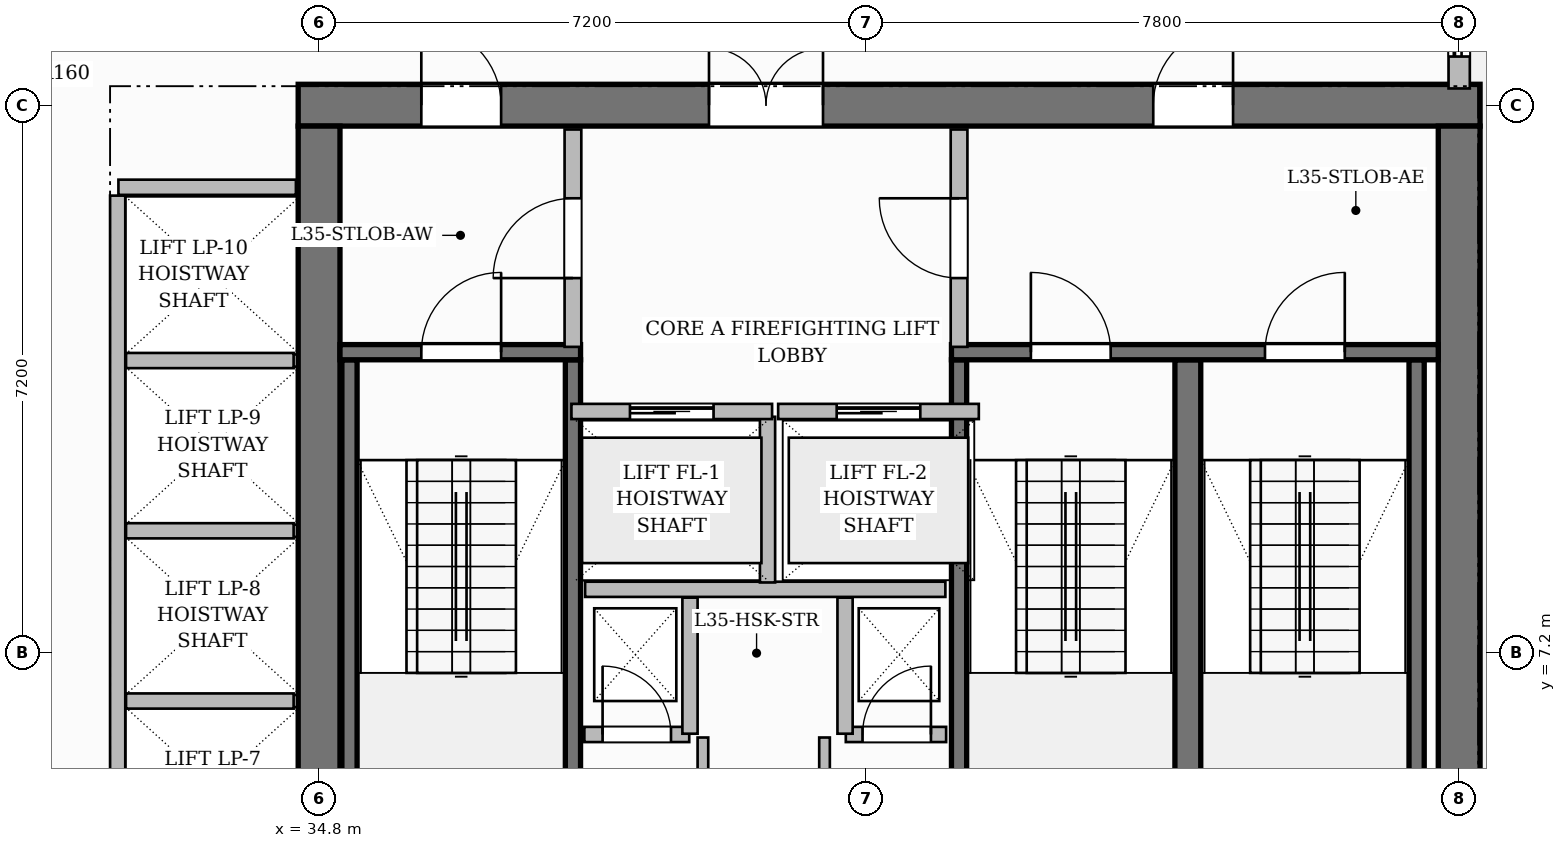
"""IFC4 building model, lengths in metres.
Left out: names, types, materials, properties, quantities, classifications, styles, units other than length and angle.
Written with IfcOpenShell. Run it as: python <this file> out.ifc"""

import sys

from ifc_helpers import new_model, si_unit, direction, frame, frame_2d, origin, place, context, subcontext, project, spatial, rectangle, extrude, source, transform, mapped, element, fill, save


model = new_model("IFC4")
c1 = context("Model", 3, precision=1e-05, world=origin(), true_north=direction((0.0, 1.0)))
c2 = subcontext(c1, "Body", "Model", "MODEL_VIEW")
j1 = project(units=[si_unit("LENGTHUNIT", "METRE"), si_unit("PLANEANGLEUNIT", "RADIAN")], contexts=[c1])
p1 = place(None, origin())
s1 = spatial("IfcSite", under=j1, at=p1, CompositionType="ELEMENT")
p2 = place(p1, origin())
s2 = spatial("IfcBuilding", under=s1, at=p2, CompositionType="ELEMENT")
p3 = place(p2, frame((0.0, 0.0, 141.4)))
s3 = spatial("IfcBuildingStorey", under=s2, at=p3, CompositionType="ELEMENT", Elevation=141.4)
p4 = place(p3, frame((34.525, 14.4, 0.0), z_axis=(0.0, 0.0, 1.0), x_axis=(1.0, 0.0, 0.0)))
e1 = element("IfcWall", 1, at=p4, inside=s3, PredefinedType="SHEAR", context=c2, shape_type="SweptSolid", body=[
    extrude(rectangle(XDim=15.55, YDim=0.55, at=frame_2d((7.775, 0.0))), origin(), (0.0, 0.0, 1.0), 3.7),
])
p5 = place(p4, frame((5.405, 0.0, 0.0)))
e2 = element("IfcOpeningElement", 2, at=p5, cuts=e1, PredefinedType="OPENING", context=c2, shape_type="SweptSolid", body=[
    extrude(rectangle(XDim=1.5, YDim=2.2, at=frame_2d((0.75, 1.1))), frame((0.0, 0.285, 0.0), z_axis=(0.0, -1.0, 0.0), x_axis=(1.0, 0.0, 0.0)), (0.0, 0.0, 1.0), 0.57),
])
p6 = place(p4, frame((1.62, 0.0, 0.0)))
e3 = element("IfcOpeningElement", 3, at=p6, cuts=e1, PredefinedType="OPENING", context=c2, shape_type="SweptSolid", body=[
    extrude(rectangle(XDim=1.05, YDim=2.15, at=frame_2d((0.525, 1.075))), frame((0.0, 0.285, 0.0), z_axis=(0.0, -1.0, 0.0), x_axis=(1.0, 0.0, 0.0)), (0.0, 0.0, 1.0), 0.57),
])
p7 = place(p4, frame((11.25, 0.0, 0.0)))
e4 = element("IfcOpeningElement", 4, at=p7, cuts=e1, PredefinedType="OPENING", context=c2, shape_type="SweptSolid", body=[
    extrude(rectangle(XDim=1.05, YDim=2.15, at=frame_2d((0.525, 1.075))), frame((0.0, 0.285, 0.0), z_axis=(0.0, -1.0, 0.0), x_axis=(1.0, 0.0, 0.0)), (0.0, 0.0, 1.0), 0.57),
])
for number, where, z_axis, x_axis in (
    (5, (34.8, 3.875, 0.0), (0.0, 0.0, 1.0), (0.0, 1.0, 0.0)),
    (6, (49.8, 3.875, 0.0), (0.0, 0.0, 1.0), (0.0, 1.0, 0.0)),
):
    element("IfcWall", number, at=place(p3, frame(where, z_axis=z_axis, x_axis=x_axis)), inside=s3, PredefinedType="SHEAR", context=c2, shape_type="SweptSolid", body=[
        extrude(rectangle(XDim=10.25, YDim=0.55, at=frame_2d((5.125, 0.0))), origin(), (0.0, 0.0, 1.0), 3.7),
    ])
for number, where, z_axis, x_axis in (
    (7, (35.2, 4.1, 0.0), (0.0, 0.0, 1.0), (0.0, 1.0, 0.0)),
    (8, (38.14, 4.1, 0.0), (0.0, 0.0, 1.0), (0.0, 1.0, 0.0)),
):
    element("IfcWall", number, at=place(p3, frame(where, z_axis=z_axis, x_axis=x_axis)), inside=s3, PredefinedType="SHEAR", context=c2, shape_type="SweptSolid", body=[
        extrude(rectangle(XDim=6.95, YDim=0.2, at=frame_2d((3.475, 0.0))), origin(), (0.0, 0.0, 1.0), 3.7),
    ])
p8 = place(p3, frame((35.075, 11.15, 0.0), z_axis=(0.0, 0.0, 1.0), x_axis=(1.0, 0.0, 0.0)))
e9 = element("IfcWall", 9, at=p8, inside=s3, PredefinedType="SHEAR", context=c2, shape_type="SweptSolid", body=[
    extrude(rectangle(XDim=3.165, YDim=0.2, at=frame_2d((1.583, 0.0))), origin(), (0.0, 0.0, 1.0), 3.7),
])
p9 = place(p8, frame((1.07, 0.0, 0.0)))
e10 = element("IfcOpeningElement", 10, at=p9, cuts=e9, PredefinedType="OPENING", context=c2, shape_type="SweptSolid", body=[
    extrude(rectangle(XDim=1.05, YDim=2.2, at=frame_2d((0.525, 1.1))), frame((0.0, 0.11, 0.0), z_axis=(0.0, -1.0, 0.0), x_axis=(1.0, 0.0, 0.0)), (0.0, 0.0, 1.0), 0.22),
])
p10 = place(p3, frame((43.22, 4.1, 0.0), z_axis=(0.0, 0.0, 1.0), x_axis=(0.0, 1.0, 0.0)))
e11 = element("IfcWall", 11, at=p10, inside=s3, PredefinedType="SHEAR", context=c2, shape_type="SweptSolid", body=[
    extrude(rectangle(XDim=6.95, YDim=0.2, at=frame_2d((3.475, 0.0))), origin(), (0.0, 0.0, 1.0), 3.7),
])
p11 = place(p3, frame((46.23, 4.1, 0.0), z_axis=(0.0, 0.0, 1.0), x_axis=(0.0, 1.0, 0.0)))
e12 = element("IfcWall", 12, at=p11, inside=s3, PredefinedType="SHEAR", context=c2, shape_type="SweptSolid", body=[
    extrude(rectangle(XDim=6.95, YDim=0.34, at=frame_2d((3.475, 0.0))), origin(), (0.0, 0.0, 1.0), 3.7),
])
p12 = place(p3, frame((49.24, 4.1, 0.0), z_axis=(0.0, 0.0, 1.0), x_axis=(0.0, 1.0, 0.0)))
e13 = element("IfcWall", 13, at=p12, inside=s3, PredefinedType="SHEAR", context=c2, shape_type="SweptSolid", body=[
    extrude(rectangle(XDim=6.95, YDim=0.2, at=frame_2d((3.475, 0.0))), origin(), (0.0, 0.0, 1.0), 3.7),
])
p13 = place(p3, frame((43.12, 11.15, 0.0), z_axis=(0.0, 0.0, 1.0), x_axis=(1.0, 0.0, 0.0)))
e14 = element("IfcWall", 14, at=p13, inside=s3, PredefinedType="SHEAR", context=c2, shape_type="SweptSolid", body=[
    extrude(rectangle(XDim=6.405, YDim=0.2, at=frame_2d((3.202, 0.0))), origin(), (0.0, 0.0, 1.0), 3.7),
])
p14 = place(p13, frame((1.045, 0.0, 0.0)))
e15 = element("IfcOpeningElement", 15, at=p14, cuts=e14, PredefinedType="OPENING", context=c2, shape_type="SweptSolid", body=[
    extrude(rectangle(XDim=1.05, YDim=2.2, at=frame_2d((0.525, 1.1))), frame((0.0, 0.11, 0.0), z_axis=(0.0, -1.0, 0.0), x_axis=(1.0, 0.0, 0.0)), (0.0, 0.0, 1.0), 0.22),
])
p15 = place(p13, frame((4.125, 0.0, 0.0)))
e16 = element("IfcOpeningElement", 16, at=p15, cuts=e14, PredefinedType="OPENING", context=c2, shape_type="SweptSolid", body=[
    extrude(rectangle(XDim=1.05, YDim=2.2, at=frame_2d((0.525, 1.1))), frame((0.0, 0.11, 0.0), z_axis=(0.0, -1.0, 0.0), x_axis=(1.0, 0.0, 0.0)), (0.0, 0.0, 1.0), 0.22),
])
p16 = place(p3, frame((38.3, 8.03, 0.0), z_axis=(0.0, 0.0, 1.0), x_axis=(1.0, 0.0, 0.0)))
e17 = element("IfcWall", 17, at=p16, inside=s3, PredefinedType="PARTITIONING", context=c2, shape_type="SweptSolid", body=[
    extrude(rectangle(XDim=4.74, YDim=0.2, at=frame_2d((2.37, 0.0))), origin(), (0.0, 0.0, 1.0), 3.4),
])
p17 = place(p3, frame((40.7, 8.12, 0.0), z_axis=(0.0, 0.0, 1.0), x_axis=(0.0, 1.0, 0.0)))
e18 = element("IfcWall", 18, at=p17, inside=s3, PredefinedType="PARTITIONING", context=c2, shape_type="SweptSolid", body=[
    extrude(rectangle(XDim=2.18, YDim=0.2, at=frame_2d((1.09, 0.0))), origin(), (0.0, 0.0, 1.0), 3.4),
])
p18 = place(p3, frame((38.14, 11.22, 0.0), z_axis=(0.0, 0.0, 1.0), x_axis=(0.0, 1.0, 0.0)))
e19 = element("IfcWall", 19, at=p18, inside=s3, PredefinedType="PARTITIONING", context=c2, shape_type="SweptSolid", body=[
    extrude(rectangle(XDim=2.86, YDim=0.22, at=frame_2d((1.43, 0.0))), origin(), (0.0, 0.0, 1.0), 3.4),
])
p19 = place(p18, frame((0.905, 0.0, 0.0)))
e20 = element("IfcOpeningElement", 20, at=p19, cuts=e19, PredefinedType="OPENING", context=c2, shape_type="SweptSolid", body=[
    extrude(rectangle(XDim=1.05, YDim=2.15, at=frame_2d((0.525, 1.075))), frame((0.0, 0.12, 0.0), z_axis=(0.0, -1.0, 0.0), x_axis=(1.0, 0.0, 0.0)), (0.0, 0.0, 1.0), 0.24),
])
p20 = place(p3, frame((43.22, 11.22, 0.0), z_axis=(0.0, 0.0, 1.0), x_axis=(0.0, 1.0, 0.0)))
e21 = element("IfcWall", 21, at=p20, inside=s3, PredefinedType="PARTITIONING", context=c2, shape_type="SweptSolid", body=[
    extrude(rectangle(XDim=2.86, YDim=0.22, at=frame_2d((1.43, 0.0))), origin(), (0.0, 0.0, 1.0), 3.4),
])
p21 = place(p20, frame((0.905, 0.0, 0.0)))
e22 = element("IfcOpeningElement", 22, at=p21, cuts=e21, PredefinedType="OPENING", context=c2, shape_type="SweptSolid", body=[
    extrude(rectangle(XDim=1.05, YDim=2.15, at=frame_2d((0.525, 1.075))), frame((0.0, 0.12, 0.0), z_axis=(0.0, -1.0, 0.0), x_axis=(1.0, 0.0, 0.0)), (0.0, 0.0, 1.0), 0.24),
])
p22 = place(p3, frame((38.29, 6.12, 0.0), z_axis=(0.0, 0.0, 1.0), x_axis=(1.0, 0.0, 0.0)))
e23 = element("IfcWall", 23, at=p22, inside=s3, PredefinedType="PARTITIONING", context=c2, shape_type="SweptSolid", body=[
    extrude(rectangle(XDim=1.38, YDim=0.2, at=frame_2d((0.69, 0.0))), origin(), (0.0, 0.0, 1.0), 3.4),
])
p23 = place(p22, frame((0.24, 0.0, 0.0)))
e24 = element("IfcOpeningElement", 24, at=p23, cuts=e23, PredefinedType="OPENING", context=c2, shape_type="SweptSolid", body=[
    extrude(rectangle(XDim=0.9, YDim=2.1, at=frame_2d((0.45, 1.05))), frame((0.0, 0.11, 0.0), z_axis=(0.0, -1.0, 0.0), x_axis=(1.0, 0.0, 0.0)), (0.0, 0.0, 1.0), 0.22),
])
p24 = place(p3, frame((39.68, 6.13, 0.0), z_axis=(0.0, 0.0, 1.0), x_axis=(0.0, 1.0, 0.0)))
e25 = element("IfcWall", 25, at=p24, inside=s3, PredefinedType="PARTITIONING", context=c2, shape_type="SweptSolid", body=[
    extrude(rectangle(XDim=1.79, YDim=0.2, at=frame_2d((0.895, 0.0))), origin(), (0.0, 0.0, 1.0), 3.4),
])
p25 = place(p3, frame((41.73, 6.12, 0.0), z_axis=(0.0, 0.0, 1.0), x_axis=(1.0, 0.0, 0.0)))
e26 = element("IfcWall", 26, at=p25, inside=s3, PredefinedType="PARTITIONING", context=c2, shape_type="SweptSolid", body=[
    extrude(rectangle(XDim=1.32, YDim=0.2, at=frame_2d((0.66, 0.0))), origin(), (0.0, 0.0, 1.0), 3.4),
])
p26 = place(p25, frame((0.22, 0.0, 0.0)))
e27 = element("IfcOpeningElement", 27, at=p26, cuts=e26, PredefinedType="OPENING", context=c2, shape_type="SweptSolid", body=[
    extrude(rectangle(XDim=0.9, YDim=2.1, at=frame_2d((0.45, 1.05))), frame((0.0, 0.11, 0.0), z_axis=(0.0, -1.0, 0.0), x_axis=(1.0, 0.0, 0.0)), (0.0, 0.0, 1.0), 0.22),
])
p27 = place(p3, frame((41.72, 6.13, 0.0), z_axis=(0.0, 0.0, 1.0), x_axis=(0.0, 1.0, 0.0)))
e28 = element("IfcWall", 28, at=p27, inside=s3, PredefinedType="PARTITIONING", context=c2, shape_type="SweptSolid", body=[
    extrude(rectangle(XDim=1.79, YDim=0.2, at=frame_2d((0.895, 0.0))), origin(), (0.0, 0.0, 1.0), 3.4),
])
for number, where, z_axis, x_axis in (
    (29, (39.85, 3.895, 0.0), (0.0, 0.0, 1.0), (0.0, 1.0, 0.0)),
    (30, (41.45, 3.895, 0.0), (0.0, 0.0, 1.0), (0.0, 1.0, 0.0)),
):
    element("IfcWall", number, at=place(p3, frame(where, z_axis=z_axis, x_axis=x_axis)), inside=s3, PredefinedType="PARTITIONING", context=c2, shape_type="SweptSolid", body=[
        extrude(rectangle(XDim=2.185, YDim=0.14, at=frame_2d((1.093, 0.0))), origin(), (0.0, 0.0, 1.0), 3.4),
    ])
p28 = place(p3, frame((32.16, 13.32, 0.0), z_axis=(0.0, 0.0, 1.0), x_axis=(1.0, 0.0, 0.0)))
e31 = element("IfcWall", 31, at=p28, inside=s3, PredefinedType="PARTITIONING", context=c2, shape_type="SweptSolid", body=[
    extrude(rectangle(XDim=2.335, YDim=0.2, at=frame_2d((1.167, 0.0))), origin(), (0.0, 0.0, 1.0), 3.4),
])
p29 = place(p3, frame((32.15, 4.39, 0.0), z_axis=(0.0, 0.0, 1.0), x_axis=(0.0, 1.0, 0.0)))
e32 = element("IfcWall", 32, at=p29, inside=s3, PredefinedType="PARTITIONING", context=c2, shape_type="SweptSolid", body=[
    extrude(rectangle(XDim=8.82, YDim=0.2, at=frame_2d((4.41, 0.0))), origin(), (0.0, 0.0, 1.0), 3.4),
])
for number, where, z_axis, x_axis in (
    (33, (32.26, 6.56, 0.0), (0.0, 0.0, 1.0), (1.0, 0.0, 0.0)),
    (34, (32.26, 8.8, 0.0), (0.0, 0.0, 1.0), (1.0, 0.0, 0.0)),
    (35, (32.26, 11.04, 0.0), (0.0, 0.0, 1.0), (1.0, 0.0, 0.0)),
):
    element("IfcWall", number, at=place(p3, frame(where, z_axis=z_axis, x_axis=x_axis)), inside=s3, PredefinedType="PARTITIONING", context=c2, shape_type="SweptSolid", body=[
        extrude(rectangle(XDim=2.205, YDim=0.2, at=frame_2d((1.103, 0.0))), origin(), (0.0, 0.0, 1.0), 3.4),
    ])
p30 = place(p3, frame((38.12, 10.37, 0.0), z_axis=(0.0, 0.0, 1.0), x_axis=(1.0, 0.0, 0.0)))
e36 = element("IfcWall", 36, at=p30, inside=s3, PredefinedType="PARTITIONING", context=c2, shape_type="SweptSolid", body=[
    extrude(rectangle(XDim=2.64, YDim=0.2, at=frame_2d((1.32, 0.0))), origin(), (0.0, 0.0, 1.0), 3.4),
])
p31 = place(p30, frame((0.77, 0.0, 0.0)))
e37 = element("IfcOpeningElement", 37, at=p31, cuts=e36, PredefinedType="OPENING", context=c2, shape_type="SweptSolid", body=[
    extrude(rectangle(XDim=1.1, YDim=2.2, at=frame_2d((0.55, 1.1))), frame((0.0, 0.11, 0.0), z_axis=(0.0, -1.0, 0.0), x_axis=(1.0, 0.0, 0.0)), (0.0, 0.0, 1.0), 0.22),
])
p32 = place(p3, frame((40.84, 10.37, 0.0), z_axis=(0.0, 0.0, 1.0), x_axis=(1.0, 0.0, 0.0)))
e38 = element("IfcWall", 38, at=p32, inside=s3, PredefinedType="PARTITIONING", context=c2, shape_type="SweptSolid", body=[
    extrude(rectangle(XDim=2.64, YDim=0.2, at=frame_2d((1.32, 0.0))), origin(), (0.0, 0.0, 1.0), 3.4),
])
p33 = place(p32, frame((0.77, 0.0, 0.0)))
e39 = element("IfcOpeningElement", 39, at=p33, cuts=e38, PredefinedType="OPENING", context=c2, shape_type="SweptSolid", body=[
    extrude(rectangle(XDim=1.1, YDim=2.2, at=frame_2d((0.55, 1.1))), frame((0.0, 0.11, 0.0), z_axis=(0.0, -1.0, 0.0), x_axis=(1.0, 0.0, 0.0)), (0.0, 0.0, 1.0), 0.22),
])
p34 = place(p3, frame((49.8, 14.62, 0.0), z_axis=(0.0, 0.0, 1.0), x_axis=(0.0, 1.0, 0.0)))
e40 = element("IfcWall", 40, at=p34, inside=s3, PredefinedType="SOLIDWALL", context=c2, shape_type="SweptSolid", body=[
    extrude(rectangle(XDim=6.93, YDim=0.28, at=frame_2d((3.465, 0.0))), origin(), (0.0, 0.0, 1.0), 2.885),
])
p35 = place(p34, frame((0.42, 0.0, 0.0)))
e41 = element("IfcOpeningElement", 41, at=p35, cuts=e40, PredefinedType="OPENING", context=c2, shape_type="SweptSolid", body=[
    extrude(rectangle(XDim=1.2, YDim=2.2, at=frame_2d((0.6, 1.1))), frame((0.0, 0.15, 0.0), z_axis=(0.0, -1.0, 0.0), x_axis=(1.0, 0.0, 0.0)), (0.0, 0.0, 1.0), 0.3),
])
p36 = place(p34, frame((3.659, 0.0, 0.8)))
e42 = element("IfcOpeningElement", 42, at=p36, cuts=e40, PredefinedType="OPENING", context=c2, shape_type="SweptSolid", body=[
    extrude(rectangle(XDim=1.8, YDim=1.85, at=frame_2d((0.9, 0.925))), frame((0.0, 0.15, 0.0), z_axis=(0.0, -1.0, 0.0), x_axis=(1.0, 0.0, 0.0)), (0.0, 0.0, 1.0), 0.3),
])
m1 = source(origin(), c2, "Body", "SweptSolid", [
    extrude(rectangle(XDim=1.05, YDim=2.2, at=frame_2d((0.525, 1.1))), frame((0.0, 0.025, 0.0), z_axis=(0.0, -1.0, 0.0), x_axis=(1.0, 0.0, 0.0)), (0.0, 0.0, 1.0), 0.05),
])
p37 = place(p9, origin())
e43 = element("IfcDoor", 43, at=p37, inside=s3, OperationType="SINGLE_SWING_RIGHT", PredefinedType="DOOR", context=c2, shape_type="MappedRepresentation", body=[
    mapped(m1, transform((0.0, 0.0, 0.0), scale=1.0)),
])
fill(e10, e43)
p38 = place(p14, origin())
e44 = element("IfcDoor", 44, at=p38, inside=s3, OperationType="SINGLE_SWING_LEFT", PredefinedType="DOOR", context=c2, shape_type="MappedRepresentation", body=[
    mapped(m1, transform((0.0, 0.0, 0.0), scale=1.0)),
])
fill(e15, e44)
p39 = place(p15, origin())
e45 = element("IfcDoor", 45, at=p39, inside=s3, OperationType="SINGLE_SWING_RIGHT", PredefinedType="DOOR", context=c2, shape_type="MappedRepresentation", body=[
    mapped(m1, transform((0.0, 0.0, 0.0), scale=1.0)),
])
fill(e16, e45)
m2 = source(origin(), c2, "Body", "SweptSolid", [
    extrude(rectangle(XDim=1.05, YDim=2.15, at=frame_2d((0.525, 1.075))), frame((0.0, 0.025, 0.0), z_axis=(0.0, -1.0, 0.0), x_axis=(1.0, 0.0, 0.0)), (0.0, 0.0, 1.0), 0.05),
])
p40 = place(p19, origin())
e46 = element("IfcDoor", 46, at=p40, inside=s3, OperationType="SINGLE_SWING_LEFT", PredefinedType="DOOR", context=c2, shape_type="MappedRepresentation", body=[
    mapped(m2, transform((0.0, 0.0, 0.0), scale=1.0)),
])
fill(e20, e46)
p41 = place(p21, origin())
e47 = element("IfcDoor", 47, at=p41, inside=s3, OperationType="SINGLE_SWING_RIGHT", PredefinedType="DOOR", context=c2, shape_type="MappedRepresentation", body=[
    mapped(m2, transform((0.0, 0.0, 0.0), scale=1.0)),
])
fill(e22, e47)
m3 = source(origin(), c2, "Body", "SweptSolid", [
    extrude(rectangle(XDim=1.5, YDim=2.2, at=frame_2d((0.75, 1.1))), frame((0.0, 0.025, 0.0), z_axis=(0.0, -1.0, 0.0), x_axis=(1.0, 0.0, 0.0)), (0.0, 0.0, 1.0), 0.05),
])
p42 = place(p5, origin())
e48 = element("IfcDoor", 48, at=p42, inside=s3, OperationType="DOUBLE_DOOR_SINGLE_SWING", PredefinedType="DOOR", context=c2, shape_type="MappedRepresentation", body=[
    mapped(m3, transform((0.0, 0.0, 0.0), scale=1.0)),
])
fill(e2, e48)
p43 = place(p6, origin())
e49 = element("IfcDoor", 49, at=p43, inside=s3, OperationType="SINGLE_SWING_LEFT", PredefinedType="DOOR", context=c2, shape_type="MappedRepresentation", body=[
    mapped(m2, transform((0.0, 0.0, 0.0), scale=1.0)),
])
fill(e3, e49)
p44 = place(p7, origin())
e50 = element("IfcDoor", 50, at=p44, inside=s3, OperationType="SINGLE_SWING_RIGHT", PredefinedType="DOOR", context=c2, shape_type="MappedRepresentation", body=[
    mapped(m2, transform((0.0, 0.0, 0.0), scale=1.0)),
])
fill(e4, e50)
m4 = source(origin(), c2, "Body", "SweptSolid", [
    extrude(rectangle(XDim=0.9, YDim=2.1, at=frame_2d((0.45, 1.05))), frame((0.0, 0.025, 0.0), z_axis=(0.0, -1.0, 0.0), x_axis=(1.0, 0.0, 0.0)), (0.0, 0.0, 1.0), 0.05),
])
p45 = place(p23, origin())
e51 = element("IfcDoor", 51, at=p45, inside=s3, OperationType="SINGLE_SWING_LEFT", PredefinedType="DOOR", context=c2, shape_type="MappedRepresentation", body=[
    mapped(m4, transform((0.0, 0.0, 0.0), scale=1.0)),
])
fill(e24, e51)
p46 = place(p26, origin())
e52 = element("IfcDoor", 52, at=p46, inside=s3, OperationType="SINGLE_SWING_RIGHT", PredefinedType="DOOR", context=c2, shape_type="MappedRepresentation", body=[
    mapped(m4, transform((0.0, 0.0, 0.0), scale=1.0)),
])
fill(e27, e52)
m5 = source(origin(), c2, "Body", "SweptSolid", [
    extrude(rectangle(XDim=1.1, YDim=2.2, at=frame_2d((0.55, 1.1))), frame((0.0, 0.025, 0.0), z_axis=(0.0, -1.0, 0.0), x_axis=(1.0, 0.0, 0.0)), (0.0, 0.0, 1.0), 0.05),
])
p47 = place(p31, origin())
e53 = element("IfcDoor", 53, at=p47, inside=s3, OperationType="SLIDING_TO_LEFT", PredefinedType="DOOR", context=c2, shape_type="MappedRepresentation", body=[
    mapped(m5, transform((0.0, 0.0, 0.0), scale=1.0)),
])
fill(e37, e53)
p48 = place(p33, origin())
e54 = element("IfcDoor", 54, at=p48, inside=s3, OperationType="SLIDING_TO_LEFT", PredefinedType="DOOR", context=c2, shape_type="MappedRepresentation", body=[
    mapped(m5, transform((0.0, 0.0, 0.0), scale=1.0)),
])
fill(e39, e54)
m6 = source(origin(), c2, "Body", "SweptSolid", [
    extrude(rectangle(XDim=1.2, YDim=2.2, at=frame_2d((0.6, 1.1))), frame((0.0, 0.025, 0.0), z_axis=(0.0, -1.0, 0.0), x_axis=(1.0, 0.0, 0.0)), (0.0, 0.0, 1.0), 0.05),
])
p49 = place(p35, origin())
e55 = element("IfcDoor", 55, at=p49, inside=s3, OperationType="SLIDING_TO_LEFT", PredefinedType="DOOR", context=c2, shape_type="MappedRepresentation", body=[
    mapped(m6, transform((0.0, 0.0, 0.0), scale=1.0)),
])
fill(e41, e55)
save(model, sys.argv[1])
